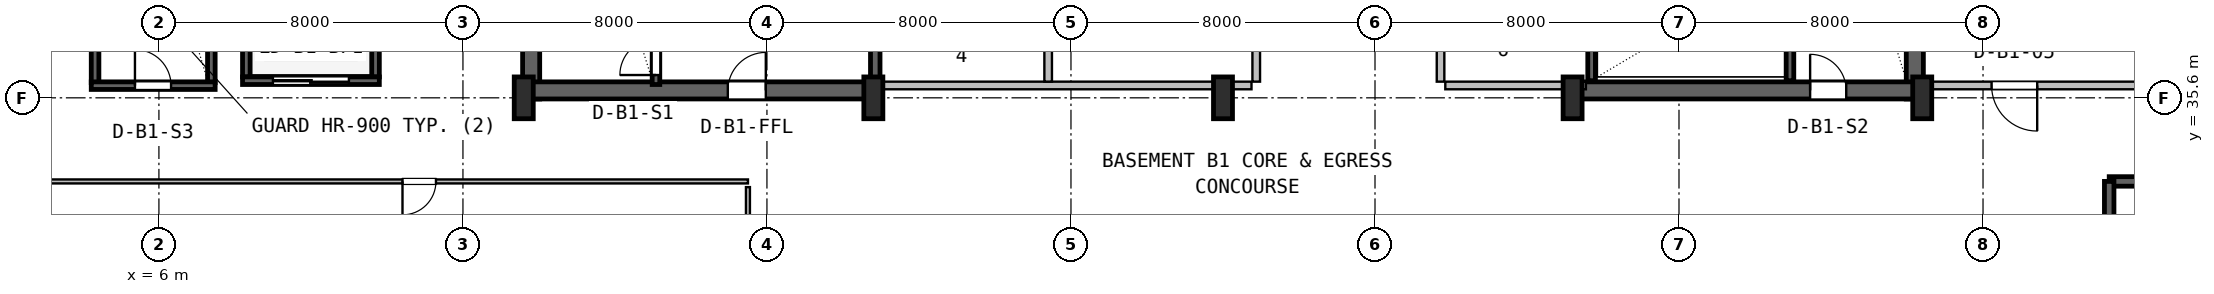
"""IFC4 building model, lengths in metres.
Left out: names, types, materials, properties, quantities, classifications, styles, units other than length and angle.
Written with IfcOpenShell. Run it as: python <this file> out.ifc"""

import sys

from ifc_helpers import new_model, si_unit, direction, frame, frame_2d, origin, origin_2d, place, context, subcontext, project, spatial, rectangle, i_section, extrude, source, transform, mapped, element, fill, save


model = new_model("IFC4")
c1 = context("Model", 3, precision=1e-05, world=origin(), true_north=direction((0.0, 1.0)))
c2 = subcontext(c1, "Body", "Model", "MODEL_VIEW")
j1 = project(units=[si_unit("LENGTHUNIT", "METRE"), si_unit("PLANEANGLEUNIT", "RADIAN")], contexts=[c1])
p1 = place(None, origin())
s1 = spatial("IfcSite", under=j1, at=p1, CompositionType="ELEMENT")
p2 = place(p1, origin())
s2 = spatial("IfcBuilding", under=s1, at=p2, CompositionType="ELEMENT")
p3 = place(p2, frame((0.0, 0.0, -4.8)))
s3 = spatial("IfcBuildingStorey", under=s2, at=p3, CompositionType="ELEMENT", Elevation=-4.8)
for number, where, z_axis, x_axis in (
    (1, (15.795, 35.57, 0.0), (0.0, 0.0, 1.0), (0.0, 1.0, 0.0)),
    (2, (52.205, 35.57, 0.0), (0.0, 0.0, 1.0), (0.0, 1.0, 0.0)),
):
    element("IfcWall", number, at=place(p3, frame(where, z_axis=z_axis, x_axis=x_axis)), inside=s3, PredefinedType="SHEAR", context=c2, shape_type="SweptSolid", body=[
        extrude(rectangle(XDim=11.23, YDim=0.45, at=frame_2d((5.615, 0.0))), origin(), (0.0, 0.0, 1.0), 4.48),
    ])
p4 = place(p3, frame((15.57, 35.795, 0.0), z_axis=(0.0, 0.0, 1.0), x_axis=(1.0, 0.0, 0.0)))
e3 = element("IfcWall", 3, at=p4, inside=s3, PredefinedType="SHEAR", context=c2, shape_type="SweptSolid", body=[
    extrude(rectangle(XDim=9.23, YDim=0.45, at=frame_2d((4.615, 0.0))), origin(), (0.0, 0.0, 1.0), 4.48),
])
p5 = place(p4, frame((5.4, 0.0, 0.0)))
e4 = element("IfcOpeningElement", 4, at=p5, cuts=e3, PredefinedType="OPENING", context=c2, shape_type="SweptSolid", body=[
    extrude(rectangle(XDim=1.0, YDim=2.1, at=frame_2d((0.5, 1.05))), frame((0.0, 0.235, 0.0), z_axis=(0.0, -1.0, 0.0), x_axis=(1.0, 0.0, 0.0)), (0.0, 0.0, 1.0), 0.47),
])
p6 = place(p3, frame((43.2, 35.795, 0.0), z_axis=(0.0, 0.0, 1.0), x_axis=(1.0, 0.0, 0.0)))
e5 = element("IfcWall", 5, at=p6, inside=s3, PredefinedType="SHEAR", context=c2, shape_type="SweptSolid", body=[
    extrude(rectangle(XDim=9.23, YDim=0.45, at=frame_2d((4.615, 0.0))), origin(), (0.0, 0.0, 1.0), 4.48),
])
p7 = place(p6, frame((6.25, 0.0, 0.0)))
e6 = element("IfcOpeningElement", 6, at=p7, cuts=e5, PredefinedType="OPENING", context=c2, shape_type="SweptSolid", body=[
    extrude(rectangle(XDim=0.95, YDim=2.1, at=frame_2d((0.475, 1.05))), frame((0.0, 0.235, 0.0), z_axis=(0.0, -1.0, 0.0), x_axis=(1.0, 0.0, 0.0)), (0.0, 0.0, 1.0), 0.47),
])
m1 = source(origin(), c2, "Body", "SweptSolid", [
    extrude(i_section(OverallWidth=0.5, OverallDepth=1.1, WebThickness=0.018, FlangeThickness=0.032, FilletRadius=0.018, at=origin_2d()), origin(), (0.0, 0.0, 1.0), 4.8),
])
for number, where, z_axis, x_axis in (
    (7, (15.6, 35.6, 0.0), (0.0, 0.0, 1.0), (1.0, 0.0, 0.0)),
    (8, (24.8, 35.6, 0.0), (0.0, 0.0, 1.0), (1.0, 0.0, 0.0)),
    (9, (34.0, 35.6, 0.0), (0.0, 0.0, 1.0), (1.0, 0.0, 0.0)),
    (10, (43.2, 35.6, 0.0), (0.0, 0.0, 1.0), (1.0, 0.0, 0.0)),
    (11, (52.4, 35.6, 0.0), (0.0, 0.0, 1.0), (1.0, 0.0, 0.0)),
):
    element("IfcColumn", number, at=place(p3, frame(where, z_axis=z_axis, x_axis=x_axis)), inside=s3, PredefinedType="COLUMN", context=c2, shape_type="MappedRepresentation", body=[
        mapped(m1, transform((0.0, 0.0, 0.0), x_axis=(1.0, 0.0, 0.0), y_axis=(0.0, 1.0, 0.0), z_axis=(0.0, 0.0, 1.0), scale=1.0)),
    ])
p8 = place(p3, frame((57.32, 33.4, 0.0), z_axis=(0.0, 0.0, 1.0), x_axis=(1.0, 0.0, 0.0)))
e12 = element("IfcWall", 12, at=p8, inside=s3, PredefinedType="SHEAR", context=c2, shape_type="SweptSolid", body=[
    extrude(rectangle(XDim=10.18, YDim=0.25, at=frame_2d((5.09, 0.0))), origin(), (0.0, 0.0, 1.0), 4.48),
])
p9 = place(p3, frame((57.32, 26.65, 0.0), z_axis=(0.0, 0.0, 1.0), x_axis=(0.0, 1.0, 0.0)))
e13 = element("IfcWall", 13, at=p9, inside=s3, PredefinedType="SHEAR", context=c2, shape_type="SweptSolid", body=[
    extrude(rectangle(XDim=6.75, YDim=0.25, at=frame_2d((3.375, 0.0))), origin(), (0.0, 0.0, 1.0), 4.48),
])
p10 = place(p9, frame((1.55, 0.0, 0.0)))
e14 = element("IfcOpeningElement", 14, at=p10, cuts=e13, PredefinedType="OPENING", context=c2, shape_type="SweptSolid", body=[
    extrude(rectangle(XDim=3.6, YDim=2.35, at=frame_2d((1.8, 1.175))), frame((0.0, 0.135, 0.0), z_axis=(0.0, -1.0, 0.0), x_axis=(1.0, 0.0, 0.0)), (0.0, 0.0, 1.0), 0.27),
])
p11 = place(p3, frame((19.08, 35.95, 0.0), z_axis=(0.0, 0.0, 1.0), x_axis=(0.0, 1.0, 0.0)))
e15 = element("IfcWall", 15, at=p11, inside=s3, PredefinedType="SHEAR", context=c2, shape_type="SweptSolid", body=[
    extrude(rectangle(XDim=9.65, YDim=0.2, at=frame_2d((4.825, 0.0))), origin(), (0.0, 0.0, 1.0), 4.48),
])
p12 = place(p11, frame((0.25, 0.0, 0.0)))
e16 = element("IfcOpeningElement", 16, at=p12, cuts=e15, PredefinedType="OPENING", context=c2, shape_type="SweptSolid", body=[
    extrude(rectangle(XDim=0.95, YDim=2.1, at=frame_2d((0.475, 1.05))), frame((0.0, 0.11, 0.0), z_axis=(0.0, -1.0, 0.0), x_axis=(1.0, 0.0, 0.0)), (0.0, 0.0, 1.0), 0.22),
])
p13 = place(p3, frame((24.85, 36.05, 0.0), z_axis=(0.0, 0.0, 1.0), x_axis=(0.0, 1.0, 0.0)))
e17 = element("IfcWall", 17, at=p13, inside=s3, PredefinedType="SHEAR", context=c2, shape_type="SweptSolid", body=[
    extrude(rectangle(XDim=10.45, YDim=0.25, at=frame_2d((5.225, 0.0))), origin(), (0.0, 0.0, 1.0), 4.48),
])
p14 = place(p3, frame((48.92, 36.05, 0.0), z_axis=(0.0, 0.0, 1.0), x_axis=(0.0, 1.0, 0.0)))
e18 = element("IfcWall", 18, at=p14, inside=s3, PredefinedType="SHEAR", context=c2, shape_type="SweptSolid", body=[
    extrude(rectangle(XDim=10.5, YDim=0.2, at=frame_2d((5.25, 0.0))), origin(), (0.0, 0.0, 1.0), 4.48),
])
p15 = place(p3, frame((43.7, 36.05, 0.0), z_axis=(0.0, 0.0, 1.0), x_axis=(0.0, 1.0, 0.0)))
e19 = element("IfcWall", 19, at=p15, inside=s3, PredefinedType="SHEAR", context=c2, shape_type="SweptSolid", body=[
    extrude(rectangle(XDim=3.05, YDim=0.2, at=frame_2d((1.525, 0.0))), origin(), (0.0, 0.0, 1.0), 4.48),
])
for number, where, z_axis, x_axis in (
    (20, (4.32, 36.0, 0.0), (0.0, 0.0, 1.0), (0.0, 1.0, 0.0)),
    (21, (7.38, 36.0, 0.0), (0.0, 0.0, 1.0), (0.0, 1.0, 0.0)),
):
    element("IfcWall", number, at=place(p3, frame(where, z_axis=z_axis, x_axis=x_axis)), inside=s3, PredefinedType="SHEAR", context=c2, shape_type="SweptSolid", body=[
        extrude(rectangle(XDim=9.6, YDim=0.2, at=frame_2d((4.8, 0.0))), origin(), (0.0, 0.0, 1.0), 4.48),
    ])
p16 = place(p3, frame((4.22, 35.92, 0.0), z_axis=(0.0, 0.0, 1.0), x_axis=(1.0, 0.0, 0.0)))
e22 = element("IfcWall", 22, at=p16, inside=s3, PredefinedType="SHEAR", context=c2, shape_type="SweptSolid", body=[
    extrude(rectangle(XDim=3.26, YDim=0.2, at=frame_2d((1.63, 0.0))), origin(), (0.0, 0.0, 1.0), 4.48),
])
p17 = place(p16, frame((1.15, 0.0, 0.0)))
e23 = element("IfcOpeningElement", 23, at=p17, cuts=e22, PredefinedType="OPENING", context=c2, shape_type="SweptSolid", body=[
    extrude(rectangle(XDim=0.95, YDim=2.1, at=frame_2d((0.475, 1.05))), frame((0.0, 0.11, 0.0), z_axis=(0.0, -1.0, 0.0), x_axis=(1.0, 0.0, 0.0)), (0.0, 0.0, 1.0), 0.22),
])
for number, where, z_axis, x_axis in (
    (24, (8.3, 36.15, 0.0), (0.0, 0.0, 1.0), (0.0, 1.0, 0.0)),
    (25, (11.7, 36.15, 0.0), (0.0, 0.0, 1.0), (0.0, 1.0, 0.0)),
):
    element("IfcWall", number, at=place(p3, frame(where, z_axis=z_axis, x_axis=x_axis)), inside=s3, PredefinedType="SHEAR", context=c2, shape_type="SweptSolid", body=[
        extrude(rectangle(XDim=3.85, YDim=0.2, at=frame_2d((1.925, 0.0))), origin(), (0.0, 0.0, 1.0), 4.48),
    ])
p18 = place(p3, frame((8.2, 36.05, 0.0), z_axis=(0.0, 0.0, 1.0), x_axis=(1.0, 0.0, 0.0)))
e26 = element("IfcWall", 26, at=p18, inside=s3, PredefinedType="SHEAR", context=c2, shape_type="SweptSolid", body=[
    extrude(rectangle(XDim=3.6, YDim=0.2, at=frame_2d((1.8, 0.0))), origin(), (0.0, 0.0, 1.0), 4.48),
])
p19 = place(p18, frame((0.8, 0.0, 0.0)))
e27 = element("IfcOpeningElement", 27, at=p19, cuts=e26, PredefinedType="OPENING", context=c2, shape_type="SweptSolid", body=[
    extrude(rectangle(XDim=2.0, YDim=2.28, at=frame_2d((1.0, 1.14))), frame((0.0, 0.11, 0.0), z_axis=(0.0, -1.0, 0.0), x_axis=(1.0, 0.0, 0.0)), (0.0, 0.0, 1.0), 0.22),
])
p20 = place(p3, frame((25.0, 35.925, 0.0), z_axis=(0.0, 0.0, 1.0), x_axis=(1.0, 0.0, 0.0)))
e28 = element("IfcWall", 28, at=p20, inside=s3, PredefinedType="PLUMBINGWALL", context=c2, shape_type="SweptSolid", body=[
    extrude(rectangle(XDim=9.75, YDim=0.2, at=frame_2d((4.875, 0.0))), origin(), (0.0, 0.0, 1.0), 4.46),
])
for number, where, z_axis, x_axis in (
    (29, (29.4, 36.025, 0.0), (0.0, 0.0, 1.0), (0.0, 1.0, 0.0)),
    (30, (34.875, 36.025, 0.0), (0.0, 0.0, 1.0), (0.0, 1.0, 0.0)),
):
    element("IfcWall", number, at=place(p3, frame(where, z_axis=z_axis, x_axis=x_axis)), inside=s3, PredefinedType="PLUMBINGWALL", context=c2, shape_type="SweptSolid", body=[
        extrude(rectangle(XDim=3.125, YDim=0.2, at=frame_2d((1.562, 0.0))), origin(), (0.0, 0.0, 1.0), 4.46),
    ])
p21 = place(p3, frame((39.85, 35.925, 0.0), z_axis=(0.0, 0.0, 1.0), x_axis=(1.0, 0.0, 0.0)))
e31 = element("IfcWall", 31, at=p21, inside=s3, PredefinedType="SOLIDWALL", context=c2, shape_type="SweptSolid", body=[
    extrude(rectangle(XDim=3.7, YDim=0.2, at=frame_2d((1.85, 0.0))), origin(), (0.0, 0.0, 1.0), 4.46),
])
p22 = place(p3, frame((39.725, 36.025, 0.0), z_axis=(0.0, 0.0, 1.0), x_axis=(0.0, 1.0, 0.0)))
e32 = element("IfcWall", 32, at=p22, inside=s3, PredefinedType="SOLIDWALL", context=c2, shape_type="SweptSolid", body=[
    extrude(rectangle(XDim=3.125, YDim=0.2, at=frame_2d((1.562, 0.0))), origin(), (0.0, 0.0, 1.0), 4.46),
])
p23 = place(p3, frame((21.5, 1.052, 0.0), z_axis=(0.0, 0.0, 1.0), x_axis=(0.0, 1.0, 0.0)))
e33 = element("IfcWall", 33, at=p23, inside=s3, PredefinedType="PARTITIONING", context=c2, shape_type="SweptSolid", body=[
    extrude(rectangle(XDim=32.198, YDim=0.105, at=frame_2d((16.099, 0.0))), origin(), (0.0, 0.0, 1.0), 3.76),
])
p24 = place(p3, frame((1.0, 33.4, 0.0), z_axis=(0.0, 0.0, 1.0), x_axis=(1.0, 0.0, 0.0)))
e34 = element("IfcWall", 34, at=p24, inside=s3, PredefinedType="PARTITIONING", context=c2, shape_type="SweptSolid", body=[
    extrude(rectangle(XDim=20.5, YDim=0.105, at=frame_2d((10.25, 0.0))), origin(), (0.0, 0.0, 1.0), 3.76),
])
p25 = place(p24, frame((11.41, 0.0, 0.0)))
e35 = element("IfcOpeningElement", 35, at=p25, cuts=e34, PredefinedType="OPENING", context=c2, shape_type="SweptSolid", body=[
    extrude(rectangle(XDim=0.88, YDim=2.06, at=frame_2d((0.44, 1.03))), frame((0.0, 0.062, 0.0), z_axis=(0.0, -1.0, 0.0), x_axis=(1.0, 0.0, 0.0)), (0.0, 0.0, 1.0), 0.125),
])
p26 = place(p3, frame((52.65, 35.925, 0.0), z_axis=(0.0, 0.0, 1.0), x_axis=(1.0, 0.0, 0.0)))
e36 = element("IfcWall", 36, at=p26, inside=s3, PredefinedType="SOLIDWALL", context=c2, shape_type="SweptSolid", body=[
    extrude(rectangle(XDim=14.7, YDim=0.2, at=frame_2d((7.35, 0.0))), origin(), (0.0, 0.0, 1.0), 3.275),
])
p27 = place(p26, frame((1.575, 0.0, 0.0)))
e37 = element("IfcOpeningElement", 37, at=p27, cuts=e36, PredefinedType="OPENING", context=c2, shape_type="SweptSolid", body=[
    extrude(rectangle(XDim=1.2, YDim=2.1, at=frame_2d((0.6, 1.05))), frame((0.0, 0.11, 0.0), z_axis=(0.0, -1.0, 0.0), x_axis=(1.0, 0.0, 0.0)), (0.0, 0.0, 1.0), 0.22),
])
m2 = source(origin(), c2, "Body", "SweptSolid", [
    extrude(rectangle(XDim=0.95, YDim=2.1, at=frame_2d((0.475, 1.05))), frame((0.0, 0.025, 0.0), z_axis=(0.0, -1.0, 0.0), x_axis=(1.0, 0.0, 0.0)), (0.0, 0.0, 1.0), 0.05),
])
p28 = place(p12, origin())
e38 = element("IfcDoor", 38, at=p28, inside=s3, OperationType="SINGLE_SWING_LEFT", PredefinedType="DOOR", context=c2, shape_type="MappedRepresentation", body=[
    mapped(m2, transform((0.0, 0.0, 0.0), x_axis=(1.0, 0.0, 0.0), y_axis=(0.0, 1.0, 0.0), z_axis=(0.0, 0.0, 1.0), scale=1.0)),
])
fill(e16, e38)
m3 = source(origin(), c2, "Body", "SweptSolid", [
    extrude(rectangle(XDim=1.0, YDim=2.1, at=frame_2d((0.5, 1.05))), frame((0.0, 0.025, 0.0), z_axis=(0.0, -1.0, 0.0), x_axis=(1.0, 0.0, 0.0)), (0.0, 0.0, 1.0), 0.05),
])
p29 = place(p5, origin())
e39 = element("IfcDoor", 39, at=p29, inside=s3, OperationType="SINGLE_SWING_RIGHT", PredefinedType="DOOR", context=c2, shape_type="MappedRepresentation", body=[
    mapped(m3, transform((0.0, 0.0, 0.0), x_axis=(1.0, 0.0, 0.0), y_axis=(0.0, 1.0, 0.0), z_axis=(0.0, 0.0, 1.0), scale=1.0)),
])
fill(e4, e39)
p30 = place(p7, origin())
e40 = element("IfcDoor", 40, at=p30, inside=s3, OperationType="SINGLE_SWING_LEFT", PredefinedType="DOOR", context=c2, shape_type="MappedRepresentation", body=[
    mapped(m2, transform((0.0, 0.0, 0.0), x_axis=(1.0, 0.0, 0.0), y_axis=(0.0, 1.0, 0.0), z_axis=(0.0, 0.0, 1.0), scale=1.0)),
])
fill(e6, e40)
p31 = place(p17, origin())
e41 = element("IfcDoor", 41, at=p31, inside=s3, OperationType="SINGLE_SWING_LEFT", PredefinedType="DOOR", context=c2, shape_type="MappedRepresentation", body=[
    mapped(m2, transform((0.0, 0.0, 0.0), x_axis=(1.0, 0.0, 0.0), y_axis=(0.0, 1.0, 0.0), z_axis=(0.0, 0.0, 1.0), scale=1.0)),
])
fill(e23, e41)
m4 = source(origin(), c2, "Body", "SweptSolid", [
    extrude(rectangle(XDim=2.0, YDim=2.28, at=frame_2d((1.0, 1.14))), frame((0.0, 0.025, 0.0), z_axis=(0.0, -1.0, 0.0), x_axis=(1.0, 0.0, 0.0)), (0.0, 0.0, 1.0), 0.05),
])
p32 = place(p19, frame((2.0, 0.0, 0.0), z_axis=(0.0, 0.0, 1.0), x_axis=(-1.0, 0.0, 0.0)))
e42 = element("IfcDoor", 42, at=p32, inside=s3, OperationType="DOUBLE_DOOR_SLIDING", PredefinedType="DOOR", context=c2, shape_type="MappedRepresentation", body=[
    mapped(m4, transform((0.0, 0.0, 0.0), x_axis=(1.0, 0.0, 0.0), y_axis=(0.0, 1.0, 0.0), z_axis=(0.0, 0.0, 1.0), scale=1.0)),
])
fill(e27, e42)
m5 = source(origin(), c2, "Body", "SweptSolid", [
    extrude(rectangle(XDim=0.88, YDim=2.06, at=frame_2d((0.44, 1.03))), frame((0.0, 0.025, 0.0), z_axis=(0.0, -1.0, 0.0), x_axis=(1.0, 0.0, 0.0)), (0.0, 0.0, 1.0), 0.05),
])
p33 = place(p25, frame((0.88, 0.0, 0.0), z_axis=(0.0, 0.0, 1.0), x_axis=(-1.0, 0.0, 0.0)))
e43 = element("IfcDoor", 43, at=p33, inside=s3, OperationType="SINGLE_SWING_LEFT", PredefinedType="DOOR", context=c2, shape_type="MappedRepresentation", body=[
    mapped(m5, transform((0.0, 0.0, 0.0), x_axis=(1.0, 0.0, 0.0), y_axis=(0.0, 1.0, 0.0), z_axis=(0.0, 0.0, 1.0), scale=1.0)),
])
fill(e35, e43)
m6 = source(origin(), c2, "Body", "SweptSolid", [
    extrude(rectangle(XDim=1.2, YDim=2.1, at=frame_2d((0.6, 1.05))), frame((0.0, 0.025, 0.0), z_axis=(0.0, -1.0, 0.0), x_axis=(1.0, 0.0, 0.0)), (0.0, 0.0, 1.0), 0.05),
])
p34 = place(p27, frame((1.2, 0.0, 0.0), z_axis=(0.0, 0.0, 1.0), x_axis=(-1.0, 0.0, 0.0)))
e44 = element("IfcDoor", 44, at=p34, inside=s3, OperationType="SINGLE_SWING_RIGHT", PredefinedType="DOOR", context=c2, shape_type="MappedRepresentation", body=[
    mapped(m6, transform((0.0, 0.0, 0.0), x_axis=(1.0, 0.0, 0.0), y_axis=(0.0, 1.0, 0.0), z_axis=(0.0, 0.0, 1.0), scale=1.0)),
])
fill(e37, e44)
save(model, sys.argv[1])
